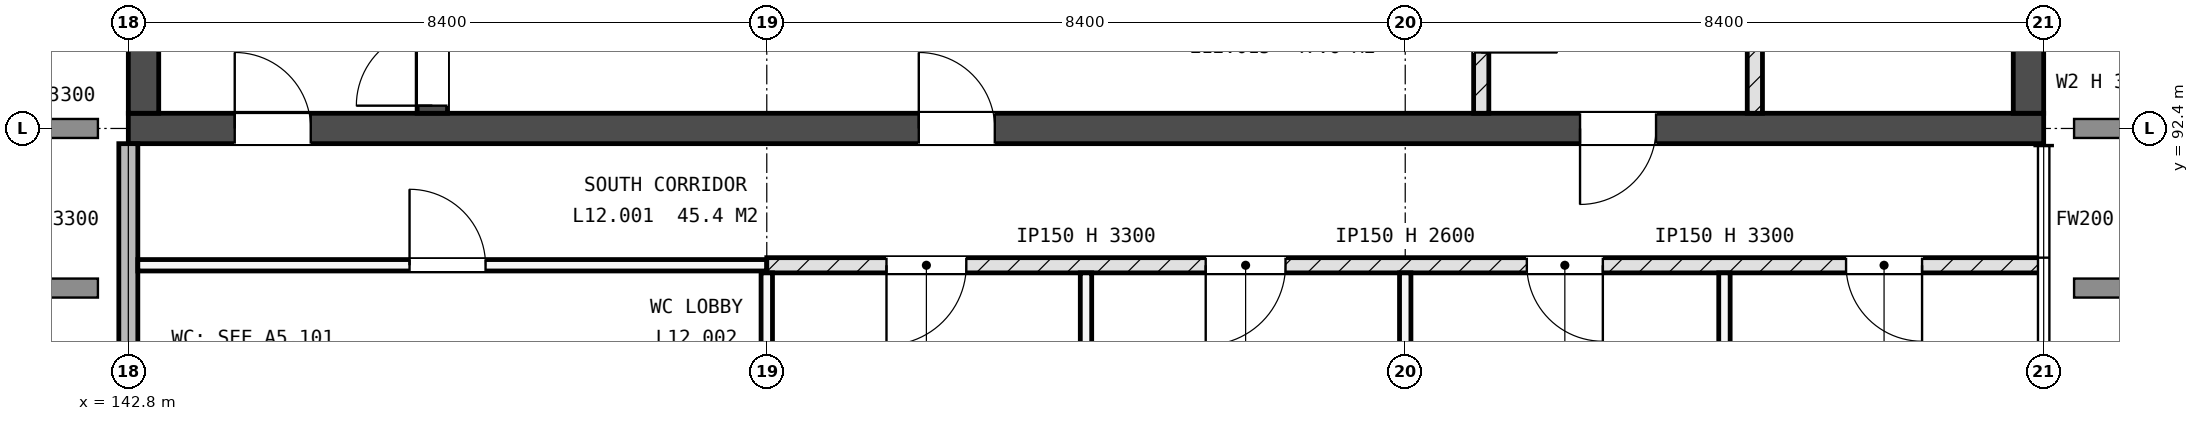
"""IFC4 building model, lengths in metres.
Left out: names, types, materials, properties, quantities, classifications, styles, units other than length and angle.
Written with IfcOpenShell. Run it as: python <this file> out.ifc"""

import sys

from ifc_helpers import new_model, si_unit, direction, frame, frame_2d, origin, place, context, subcontext, project, spatial, rectangle, extrude, element, fill, save


model = new_model("IFC4")
c1 = context("Model", 3, precision=1e-05, world=origin(), true_north=direction((0.0, 1.0)))
c2 = subcontext(c1, "Body", "Model", "MODEL_VIEW")
j1 = project(units=[si_unit("LENGTHUNIT", "METRE"), si_unit("PLANEANGLEUNIT", "RADIAN")], contexts=[c1])
p1 = place(None, origin())
s1 = spatial("IfcSite", under=j1, at=p1, CompositionType="ELEMENT")
p2 = place(p1, origin())
s2 = spatial("IfcBuilding", under=s1, at=p2, CompositionType="ELEMENT")
p3 = place(p2, frame((0.0, 0.0, 46.8)))
s3 = spatial("IfcBuildingStorey", under=s2, at=p3, CompositionType="ELEMENT", Elevation=46.8)
p4 = place(p3, frame((142.8, 92.4, -0.225), z_axis=(0.0, 0.0, 1.0), x_axis=(1.0, 0.0, 0.0)))
e1 = element("IfcWall", 1, at=p4, inside=s3, PredefinedType="SHEAR", context=c2, shape_type="SweptSolid", body=[
    extrude(rectangle(XDim=25.2, YDim=0.4, at=frame_2d((12.6, 0.0))), origin(), (0.0, 0.0, 1.0), 3.525),
])
p5 = place(p4, frame((1.4, 0.0, 0.225)))
e2 = element("IfcOpeningElement", 2, at=p5, cuts=e1, PredefinedType="OPENING", context=c2, shape_type="SweptSolid", body=[
    extrude(rectangle(XDim=1.0, YDim=2.1, at=frame_2d((0.5, 1.05))), frame((0.0, 0.21, 0.0), z_axis=(0.0, -1.0, 0.0), x_axis=(1.0, 0.0, 0.0)), (0.0, 0.0, 1.0), 0.42),
])
p6 = place(p4, frame((19.1, 0.0, 0.225)))
e3 = element("IfcOpeningElement", 3, at=p6, cuts=e1, PredefinedType="OPENING", context=c2, shape_type="SweptSolid", body=[
    extrude(rectangle(XDim=1.0, YDim=2.1, at=frame_2d((0.5, 1.05))), frame((0.0, 0.21, 0.0), z_axis=(0.0, -1.0, 0.0), x_axis=(1.0, 0.0, 0.0)), (0.0, 0.0, 1.0), 0.42),
])
p7 = place(p4, frame((10.4, 0.0, 0.225)))
e4 = element("IfcOpeningElement", 4, at=p7, cuts=e1, PredefinedType="OPENING", context=c2, shape_type="SweptSolid", body=[
    extrude(rectangle(XDim=1.0, YDim=2.1, at=frame_2d((0.5, 1.05))), frame((0.0, 0.21, 0.0), z_axis=(0.0, -1.0, 0.0), x_axis=(1.0, 0.0, 0.0)), (0.0, 0.0, 1.0), 0.42),
])
p8 = place(p3, frame((143.0, 92.6, -0.225), z_axis=(0.0, 0.0, 1.0), x_axis=(0.0, 1.0, 0.0)))
e5 = element("IfcWall", 5, at=p8, inside=s3, PredefinedType="SHEAR", context=c2, shape_type="SweptSolid", body=[
    extrude(rectangle(XDim=16.4, YDim=0.4, at=frame_2d((8.2, 0.0))), origin(), (0.0, 0.0, 1.0), 3.525),
])
p9 = place(p8, frame((3.0, 0.0, 1.825)))
e6 = element("IfcOpeningElement", 6, at=p9, cuts=e5, PredefinedType="OPENING", context=c2, shape_type="SweptSolid", body=[
    extrude(rectangle(XDim=1.2, YDim=0.9, at=frame_2d((0.6, 0.45))), frame((0.0, 0.21, 0.0), z_axis=(0.0, -1.0, 0.0), x_axis=(1.0, 0.0, 0.0)), (0.0, 0.0, 1.0), 0.42),
])
p10 = place(p3, frame((167.8, 92.6, -0.225), z_axis=(0.0, 0.0, 1.0), x_axis=(0.0, 1.0, 0.0)))
e7 = element("IfcWall", 7, at=p10, inside=s3, PredefinedType="SHEAR", context=c2, shape_type="SweptSolid", body=[
    extrude(rectangle(XDim=16.4, YDim=0.4, at=frame_2d((8.2, 0.0))), origin(), (0.0, 0.0, 1.0), 3.525),
])
p11 = place(p10, frame((12.2, 0.0, 1.825)))
e8 = element("IfcOpeningElement", 8, at=p11, cuts=e7, PredefinedType="OPENING", context=c2, shape_type="SweptSolid", body=[
    extrude(rectangle(XDim=1.2, YDim=0.9, at=frame_2d((0.6, 0.45))), frame((0.0, 0.21, 0.0), z_axis=(0.0, -1.0, 0.0), x_axis=(1.0, 0.0, 0.0)), (0.0, 0.0, 1.0), 0.42),
])
p12 = place(p3, frame((146.8, 92.6, -0.225), z_axis=(0.0, 0.0, 1.0), x_axis=(0.0, 1.0, 0.0)))
e9 = element("IfcWall", 9, at=p12, inside=s3, PredefinedType="SHEAR", context=c2, shape_type="SweptSolid", body=[
    extrude(rectangle(XDim=7.525, YDim=0.4, at=frame_2d((3.762, 0.0))), origin(), (0.0, 0.0, 1.0), 3.525),
])
p13 = place(p12, frame((0.1, 0.0, 0.225)))
e10 = element("IfcOpeningElement", 10, at=p13, cuts=e9, PredefinedType="OPENING", context=c2, shape_type="SweptSolid", body=[
    extrude(rectangle(XDim=1.0, YDim=2.1, at=frame_2d((0.5, 1.05))), frame((0.0, 0.21, 0.0), z_axis=(0.0, -1.0, 0.0), x_axis=(1.0, 0.0, 0.0)), (0.0, 0.0, 1.0), 0.42),
])
p14 = place(p3, frame((142.8, 84.4, 0.0), z_axis=(0.0, 0.0, 1.0), x_axis=(0.0, 1.0, 0.0)))
e11 = element("IfcWall", 11, at=p14, inside=s3, PredefinedType="STANDARD", context=c2, shape_type="SweptSolid", body=[
    extrude(rectangle(XDim=7.8, YDim=0.25, at=frame_2d((3.9, 0.0))), origin(), (0.0, 0.0, 1.0), 3.3),
])
p15 = place(p14, frame((2.3, 0.0, 2.1)))
e12 = element("IfcOpeningElement", 12, at=p15, cuts=e11, PredefinedType="OPENING", context=c2, shape_type="SweptSolid", body=[
    extrude(rectangle(XDim=0.9, YDim=0.6, at=frame_2d((0.45, 0.3))), frame((0.0, 0.135, 0.0), z_axis=(0.0, -1.0, 0.0), x_axis=(1.0, 0.0, 0.0)), (0.0, 0.0, 1.0), 0.27),
])
p16 = place(p3, frame((142.925, 90.6, 0.0), z_axis=(0.0, 0.0, 1.0), x_axis=(1.0, 0.0, 0.0)))
e13 = element("IfcWall", 13, at=p16, inside=s3, PredefinedType="PARTITIONING", context=c2, shape_type="SweptSolid", body=[
    extrude(rectangle(XDim=8.275, YDim=0.15, at=frame_2d((4.137, 0.0))), origin(), (0.0, 0.0, 1.0), 3.3),
])
p17 = place(p16, frame((3.575, 0.0, 0.0)))
e14 = element("IfcOpeningElement", 14, at=p17, cuts=e13, PredefinedType="OPENING", context=c2, shape_type="SweptSolid", body=[
    extrude(rectangle(XDim=1.0, YDim=2.1, at=frame_2d((0.5, 1.05))), frame((0.0, 0.085, 0.0), z_axis=(0.0, -1.0, 0.0), x_axis=(1.0, 0.0, 0.0)), (0.0, 0.0, 1.0), 0.17),
])
p18 = place(p3, frame((151.2, 90.6, 0.0), z_axis=(0.0, 0.0, 1.0), x_axis=(1.0, 0.0, 0.0)))
e15 = element("IfcWall", 15, at=p18, inside=s3, PredefinedType="SOLIDWALL", context=c2, shape_type="SweptSolid", body=[
    extrude(rectangle(XDim=16.8, YDim=0.2, at=frame_2d((8.4, 0.0))), origin(), (0.0, 0.0, 1.0), 3.3),
])
p19 = place(p18, frame((1.575, 0.0, 0.0)))
e16 = element("IfcOpeningElement", 16, at=p19, cuts=e15, PredefinedType="OPENING", context=c2, shape_type="SweptSolid", body=[
    extrude(rectangle(XDim=1.05, YDim=2.1, at=frame_2d((0.525, 1.05))), frame((0.0, 0.11, 0.0), z_axis=(0.0, -1.0, 0.0), x_axis=(1.0, 0.0, 0.0)), (0.0, 0.0, 1.0), 0.22),
])
p20 = place(p18, frame((5.775, 0.0, 0.0)))
e17 = element("IfcOpeningElement", 17, at=p20, cuts=e15, PredefinedType="OPENING", context=c2, shape_type="SweptSolid", body=[
    extrude(rectangle(XDim=1.05, YDim=2.1, at=frame_2d((0.525, 1.05))), frame((0.0, 0.11, 0.0), z_axis=(0.0, -1.0, 0.0), x_axis=(1.0, 0.0, 0.0)), (0.0, 0.0, 1.0), 0.22),
])
p21 = place(p18, frame((10.0, 0.0, 0.0)))
e18 = element("IfcOpeningElement", 18, at=p21, cuts=e15, PredefinedType="OPENING", context=c2, shape_type="SweptSolid", body=[
    extrude(rectangle(XDim=1.0, YDim=2.1, at=frame_2d((0.5, 1.05))), frame((0.0, 0.11, 0.0), z_axis=(0.0, -1.0, 0.0), x_axis=(1.0, 0.0, 0.0)), (0.0, 0.0, 1.0), 0.22),
])
p22 = place(p18, frame((14.2, 0.0, 0.0)))
e19 = element("IfcOpeningElement", 19, at=p22, cuts=e15, PredefinedType="OPENING", context=c2, shape_type="SweptSolid", body=[
    extrude(rectangle(XDim=1.0, YDim=2.1, at=frame_2d((0.5, 1.05))), frame((0.0, 0.11, 0.0), z_axis=(0.0, -1.0, 0.0), x_axis=(1.0, 0.0, 0.0)), (0.0, 0.0, 1.0), 0.22),
])
p23 = place(p3, frame((151.2, 84.0, 0.0), z_axis=(0.0, 0.0, 1.0), x_axis=(0.0, 1.0, 0.0)))
e20 = element("IfcWall", 20, at=p23, inside=s3, PredefinedType="PARTITIONING", context=c2, shape_type="SweptSolid", body=[
    extrude(rectangle(XDim=6.5, YDim=0.15, at=frame_2d((3.25, 0.0))), origin(), (0.0, 0.0, 1.0), 2.6),
])
p24 = place(p3, frame((155.4, 84.0, 0.0), z_axis=(0.0, 0.0, 1.0), x_axis=(0.0, 1.0, 0.0)))
e21 = element("IfcWall", 21, at=p24, inside=s3, PredefinedType="PARTITIONING", context=c2, shape_type="SweptSolid", body=[
    extrude(rectangle(XDim=6.5, YDim=0.15, at=frame_2d((3.25, 0.0))), origin(), (0.0, 0.0, 1.0), 3.3),
])
p25 = place(p3, frame((159.6, 84.0, 0.0), z_axis=(0.0, 0.0, 1.0), x_axis=(0.0, 1.0, 0.0)))
e22 = element("IfcWall", 22, at=p25, inside=s3, PredefinedType="PARTITIONING", context=c2, shape_type="SweptSolid", body=[
    extrude(rectangle(XDim=6.5, YDim=0.15, at=frame_2d((3.25, 0.0))), origin(), (0.0, 0.0, 1.0), 2.6),
])
p26 = place(p3, frame((160.6, 92.6, 0.0), z_axis=(0.0, 0.0, 1.0), x_axis=(0.0, 1.0, 0.0)))
e23 = element("IfcWall", 23, at=p26, inside=s3, PredefinedType="SOLIDWALL", context=c2, shape_type="SweptSolid", body=[
    extrude(rectangle(XDim=12.5, YDim=0.2, at=frame_2d((6.25, 0.0))), origin(), (0.0, 0.0, 1.0), 3.3),
])
p27 = place(p26, frame((5.1, 0.0, 0.0)))
e24 = element("IfcOpeningElement", 24, at=p27, cuts=e23, PredefinedType="OPENING", context=c2, shape_type="SweptSolid", body=[
    extrude(rectangle(XDim=0.8, YDim=2.1, at=frame_2d((0.4, 1.05))), frame((0.0, 0.11, 0.0), z_axis=(0.0, -1.0, 0.0), x_axis=(1.0, 0.0, 0.0)), (0.0, 0.0, 1.0), 0.22),
])
p28 = place(p26, frame((0.8, 0.0, 0.0)))
e25 = element("IfcOpeningElement", 25, at=p28, cuts=e23, PredefinedType="OPENING", context=c2, shape_type="SweptSolid", body=[
    extrude(rectangle(XDim=1.0, YDim=2.1, at=frame_2d((0.5, 1.05))), frame((0.0, 0.11, 0.0), z_axis=(0.0, -1.0, 0.0), x_axis=(1.0, 0.0, 0.0)), (0.0, 0.0, 1.0), 0.22),
])
p29 = place(p3, frame((163.8, 84.0, 0.0), z_axis=(0.0, 0.0, 1.0), x_axis=(0.0, 1.0, 0.0)))
e26 = element("IfcWall", 26, at=p29, inside=s3, PredefinedType="PARTITIONING", context=c2, shape_type="SweptSolid", body=[
    extrude(rectangle(XDim=6.5, YDim=0.15, at=frame_2d((3.25, 0.0))), origin(), (0.0, 0.0, 1.0), 3.3),
])
p30 = place(p3, frame((164.2, 92.6, 0.0), z_axis=(0.0, 0.0, 1.0), x_axis=(0.0, 1.0, 0.0)))
e27 = element("IfcWall", 27, at=p30, inside=s3, PredefinedType="SOLIDWALL", context=c2, shape_type="SweptSolid", body=[
    extrude(rectangle(XDim=8.75, YDim=0.2, at=frame_2d((4.375, 0.0))), origin(), (0.0, 0.0, 1.0), 3.3),
])
p31 = place(p30, frame((1.7, 0.0, 0.0)))
e28 = element("IfcOpeningElement", 28, at=p31, cuts=e27, PredefinedType="OPENING", context=c2, shape_type="SweptSolid", body=[
    extrude(rectangle(XDim=0.8, YDim=2.1, at=frame_2d((0.4, 1.05))), frame((0.0, 0.11, 0.0), z_axis=(0.0, -1.0, 0.0), x_axis=(1.0, 0.0, 0.0)), (0.0, 0.0, 1.0), 0.22),
])
p32 = place(p30, frame((6.3, 0.0, 0.0)))
e29 = element("IfcOpeningElement", 29, at=p32, cuts=e27, PredefinedType="OPENING", context=c2, shape_type="SweptSolid", body=[
    extrude(rectangle(XDim=0.8, YDim=2.1, at=frame_2d((0.4, 1.05))), frame((0.0, 0.11, 0.0), z_axis=(0.0, -1.0, 0.0), x_axis=(1.0, 0.0, 0.0)), (0.0, 0.0, 1.0), 0.22),
])
p33 = place(p5, origin())
e30 = element("IfcDoor", 30, at=p33, inside=s3, OperationType="SINGLE_SWING_RIGHT", PredefinedType="DOOR", context=c2, shape_type="SweptSolid", body=[
    extrude(rectangle(XDim=1.0, YDim=2.1, at=frame_2d((0.5, 1.05))), frame((0.0, 0.025, 0.0), z_axis=(0.0, -1.0, 0.0), x_axis=(1.0, 0.0, 0.0)), (0.0, 0.0, 1.0), 0.05),
])
fill(e2, e30)
p34 = place(p13, origin())
e31 = element("IfcDoor", 31, at=p34, inside=s3, OperationType="SINGLE_SWING_RIGHT", PredefinedType="DOOR", context=c2, shape_type="SweptSolid", body=[
    extrude(rectangle(XDim=1.0, YDim=2.1, at=frame_2d((0.5, 1.05))), frame((0.0, 0.025, 0.0), z_axis=(0.0, -1.0, 0.0), x_axis=(1.0, 0.0, 0.0)), (0.0, 0.0, 1.0), 0.05),
])
fill(e10, e31)
p35 = place(p19, origin())
e32 = element("IfcDoor", 32, at=p35, inside=s3, OperationType="SINGLE_SWING_LEFT", PredefinedType="DOOR", context=c2, shape_type="SweptSolid", body=[
    extrude(rectangle(XDim=1.05, YDim=2.1, at=frame_2d((0.525, 1.05))), frame((0.0, 0.025, 0.0), z_axis=(0.0, -1.0, 0.0), x_axis=(1.0, 0.0, 0.0)), (0.0, 0.0, 1.0), 0.05),
])
fill(e16, e32)
p36 = place(p20, origin())
e33 = element("IfcDoor", 33, at=p36, inside=s3, OperationType="SINGLE_SWING_LEFT", PredefinedType="DOOR", context=c2, shape_type="SweptSolid", body=[
    extrude(rectangle(XDim=1.05, YDim=2.1, at=frame_2d((0.525, 1.05))), frame((0.0, 0.025, 0.0), z_axis=(0.0, -1.0, 0.0), x_axis=(1.0, 0.0, 0.0)), (0.0, 0.0, 1.0), 0.05),
])
fill(e17, e33)
p37 = place(p21, origin())
e34 = element("IfcDoor", 34, at=p37, inside=s3, OperationType="SINGLE_SWING_RIGHT", PredefinedType="DOOR", context=c2, shape_type="SweptSolid", body=[
    extrude(rectangle(XDim=1.0, YDim=2.1, at=frame_2d((0.5, 1.05))), frame((0.0, 0.025, 0.0), z_axis=(0.0, -1.0, 0.0), x_axis=(1.0, 0.0, 0.0)), (0.0, 0.0, 1.0), 0.05),
])
fill(e18, e34)
p38 = place(p22, origin())
e35 = element("IfcDoor", 35, at=p38, inside=s3, OperationType="SINGLE_SWING_RIGHT", PredefinedType="DOOR", context=c2, shape_type="SweptSolid", body=[
    extrude(rectangle(XDim=1.0, YDim=2.1, at=frame_2d((0.5, 1.05))), frame((0.0, 0.025, 0.0), z_axis=(0.0, -1.0, 0.0), x_axis=(1.0, 0.0, 0.0)), (0.0, 0.0, 1.0), 0.05),
])
fill(e19, e35)
p39 = place(p17, origin())
e36 = element("IfcDoor", 36, at=p39, inside=s3, OperationType="SINGLE_SWING_RIGHT", PredefinedType="DOOR", context=c2, shape_type="SweptSolid", body=[
    extrude(rectangle(XDim=1.0, YDim=2.1, at=frame_2d((0.5, 1.05))), frame((0.0, 0.025, 0.0), z_axis=(0.0, -1.0, 0.0), x_axis=(1.0, 0.0, 0.0)), (0.0, 0.0, 1.0), 0.05),
])
fill(e14, e36)
p40 = place(p6, origin())
e37 = element("IfcDoor", 37, at=p40, inside=s3, OperationType="SINGLE_SWING_LEFT", PredefinedType="DOOR", context=c2, shape_type="SweptSolid", body=[
    extrude(rectangle(XDim=1.0, YDim=2.1, at=frame_2d((0.5, 1.05))), frame((0.0, 0.025, 0.0), z_axis=(0.0, -1.0, 0.0), x_axis=(1.0, 0.0, 0.0)), (0.0, 0.0, 1.0), 0.05),
])
fill(e3, e37)
p41 = place(p7, origin())
e38 = element("IfcDoor", 38, at=p41, inside=s3, OperationType="SINGLE_SWING_RIGHT", PredefinedType="DOOR", context=c2, shape_type="SweptSolid", body=[
    extrude(rectangle(XDim=1.0, YDim=2.1, at=frame_2d((0.5, 1.05))), frame((0.0, 0.025, 0.0), z_axis=(0.0, -1.0, 0.0), x_axis=(1.0, 0.0, 0.0)), (0.0, 0.0, 1.0), 0.05),
])
fill(e4, e38)
save(model, sys.argv[1])
